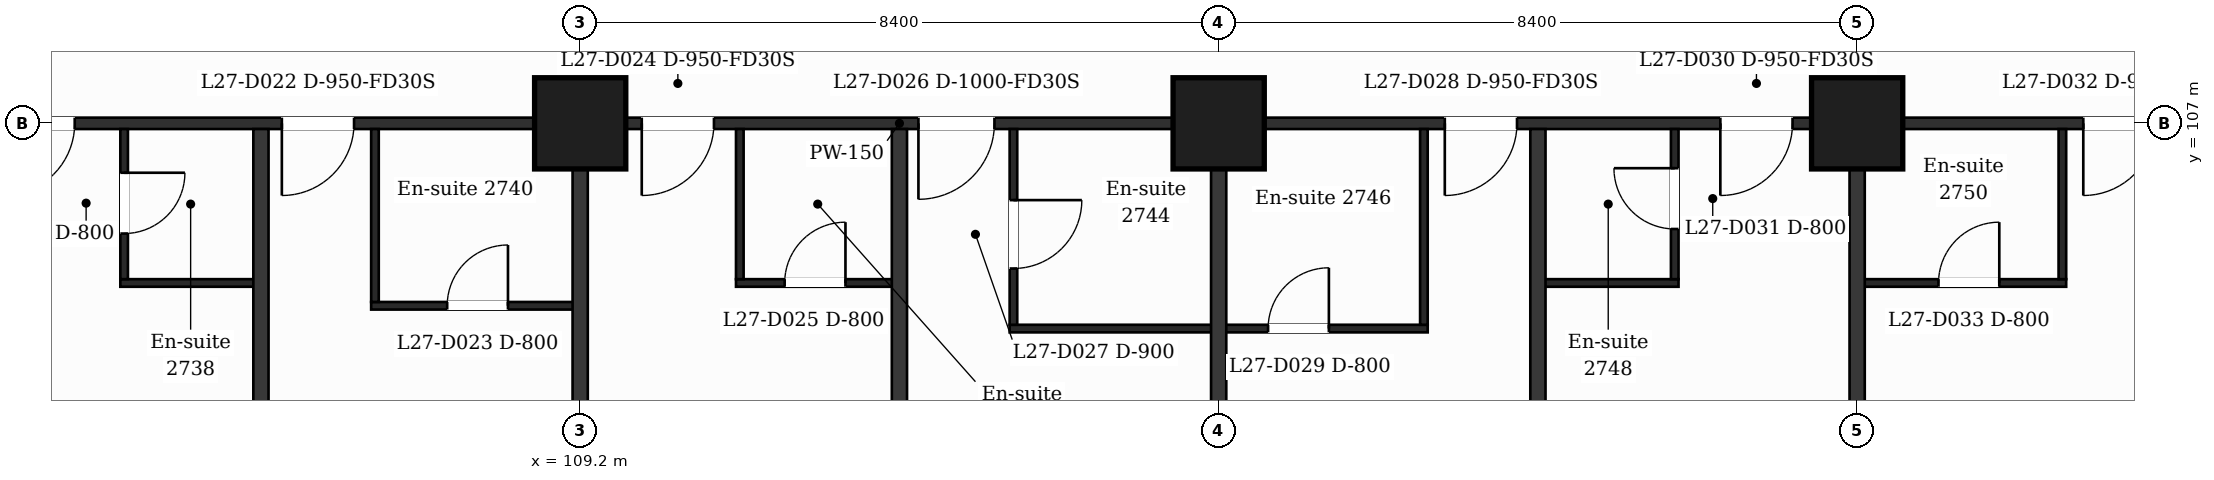
"""IFC4 building model, lengths in metres.
Left out: names, types, materials, properties, quantities, classifications, styles, units other than length and angle.
Written with IfcOpenShell. Run it as: python <this file> out.ifc"""

import sys

from ifc_helpers import new_model, si_unit, direction, frame, frame_2d, origin, origin_2d, place, context, subcontext, project, spatial, rectangle, extrude, element, fill, save


model = new_model("IFC4")
c1 = context("Model", 3, precision=1e-05, world=origin(), true_north=direction((0.0, 1.0)))
c2 = subcontext(c1, "Body", "Model", "MODEL_VIEW")
j1 = project(units=[si_unit("LENGTHUNIT", "METRE"), si_unit("PLANEANGLEUNIT", "RADIAN")], contexts=[c1])
p1 = place(None, origin())
s1 = spatial("IfcSite", under=j1, at=p1, CompositionType="ELEMENT")
p2 = place(p1, origin())
s2 = spatial("IfcBuilding", under=s1, at=p2, CompositionType="ELEMENT")
p3 = place(p2, frame((0.0, 0.0, 116.9)))
s3 = spatial("IfcBuildingStorey", under=s2, at=p3, CompositionType="ELEMENT", Elevation=116.9)
for number, where, z_axis, x_axis in (
    (1, (109.2, 107.0, 0.0), (0.0, 0.0, 1.0), (1.0, 0.0, 0.0)),
    (2, (117.6, 107.0, 0.0), (0.0, 0.0, 1.0), (1.0, 0.0, 0.0)),
    (3, (126.0, 107.0, 0.0), (0.0, 0.0, 1.0), (1.0, 0.0, 0.0)),
):
    element("IfcColumn", number, at=place(p3, frame(where, z_axis=z_axis, x_axis=x_axis)), inside=s3, PredefinedType="COLUMN", context=c2, shape_type="SweptSolid", body=[
        extrude(rectangle(XDim=1.2, YDim=1.2, at=origin_2d()), origin(), (0.0, 0.0, 1.0), 3.7),
    ])
p4 = place(p3, frame((114.85, 104.3, 0.0), z_axis=(0.0, 0.0, 1.0), x_axis=(1.0, 0.0, 0.0)))
e4 = element("IfcWall", 4, at=p4, inside=s3, PredefinedType="PARTITIONING", context=c2, shape_type="SweptSolid", body=[
    extrude(rectangle(XDim=5.5, YDim=0.1, at=frame_2d((2.75, 0.0))), origin(), (0.0, 0.0, 1.0), 3.38),
])
p5 = place(p4, frame((3.4, 0.0, 0.0)))
e5 = element("IfcOpeningElement", 5, at=p5, cuts=e4, PredefinedType="OPENING", context=c2, shape_type="SweptSolid", body=[
    extrude(rectangle(XDim=0.8, YDim=2.1, at=frame_2d((0.4, 1.05))), frame((0.0, 0.06, 0.0), z_axis=(0.0, -1.0, 0.0), x_axis=(1.0, 0.0, 0.0)), (0.0, 0.0, 1.0), 0.12),
])
p6 = place(p3, frame((106.45, 104.6, 0.0), z_axis=(0.0, 0.0, 1.0), x_axis=(1.0, 0.0, 0.0)))
e6 = element("IfcWall", 6, at=p6, inside=s3, PredefinedType="PARTITIONING", context=c2, shape_type="SweptSolid", body=[
    extrude(rectangle(XDim=2.75, YDim=0.1, at=frame_2d((1.375, 0.0))), origin(), (0.0, 0.0, 1.0), 3.38),
])
p7 = place(p6, frame((1.0, 0.0, 0.0)))
e7 = element("IfcOpeningElement", 7, at=p7, cuts=e6, PredefinedType="OPENING", context=c2, shape_type="SweptSolid", body=[
    extrude(rectangle(XDim=0.8, YDim=2.1, at=frame_2d((0.4, 1.05))), frame((0.0, 0.06, 0.0), z_axis=(0.0, -1.0, 0.0), x_axis=(1.0, 0.0, 0.0)), (0.0, 0.0, 1.0), 0.12),
])
p8 = place(p3, frame((103.15, 104.9, 0.0), z_axis=(0.0, 0.0, 1.0), x_axis=(1.0, 0.0, 0.0)))
e8 = element("IfcWall", 8, at=p8, inside=s3, PredefinedType="PARTITIONING", context=c2, shape_type="SweptSolid", body=[
    extrude(rectangle(XDim=1.85, YDim=0.1, at=frame_2d((0.925, 0.0))), origin(), (0.0, 0.0, 1.0), 3.38),
])
p9 = place(p3, frame((111.25, 104.9, 0.0), z_axis=(0.0, 0.0, 1.0), x_axis=(1.0, 0.0, 0.0)))
e9 = element("IfcWall", 9, at=p9, inside=s3, PredefinedType="PARTITIONING", context=c2, shape_type="SweptSolid", body=[
    extrude(rectangle(XDim=2.15, YDim=0.1, at=frame_2d((1.075, 0.0))), origin(), (0.0, 0.0, 1.0), 3.38),
])
p10 = place(p9, frame((0.64, 0.0, 0.0)))
e10 = element("IfcOpeningElement", 10, at=p10, cuts=e9, PredefinedType="OPENING", context=c2, shape_type="SweptSolid", body=[
    extrude(rectangle(XDim=0.8, YDim=2.1, at=frame_2d((0.4, 1.05))), frame((0.0, 0.06, 0.0), z_axis=(0.0, -1.0, 0.0), x_axis=(1.0, 0.0, 0.0)), (0.0, 0.0, 1.0), 0.12),
])
p11 = place(p3, frame((121.8, 104.9, 0.0), z_axis=(0.0, 0.0, 1.0), x_axis=(1.0, 0.0, 0.0)))
e11 = element("IfcWall", 11, at=p11, inside=s3, PredefinedType="PARTITIONING", context=c2, shape_type="SweptSolid", body=[
    extrude(rectangle(XDim=1.85, YDim=0.1, at=frame_2d((0.925, 0.0))), origin(), (0.0, 0.0, 1.0), 3.38),
])
p12 = place(p3, frame((126.0, 104.9, 0.0), z_axis=(0.0, 0.0, 1.0), x_axis=(1.0, 0.0, 0.0)))
e12 = element("IfcWall", 12, at=p12, inside=s3, PredefinedType="PARTITIONING", context=c2, shape_type="SweptSolid", body=[
    extrude(rectangle(XDim=2.75, YDim=0.1, at=frame_2d((1.375, 0.0))), origin(), (0.0, 0.0, 1.0), 3.38),
])
p13 = place(p12, frame((1.07, 0.0, 0.0)))
e13 = element("IfcOpeningElement", 13, at=p13, cuts=e12, PredefinedType="OPENING", context=c2, shape_type="SweptSolid", body=[
    extrude(rectangle(XDim=0.8, YDim=2.1, at=frame_2d((0.4, 1.05))), frame((0.0, 0.06, 0.0), z_axis=(0.0, -1.0, 0.0), x_axis=(1.0, 0.0, 0.0)), (0.0, 0.0, 1.0), 0.12),
])
p14 = place(p3, frame((87.018, 107.0, 0.0), z_axis=(0.0, 0.0, 1.0), x_axis=(1.0, 0.0, 0.0)))
e14 = element("IfcWall", 14, at=p14, inside=s3, PredefinedType="PARTITIONING", context=c2, shape_type="SweptSolid", body=[
    extrude(rectangle(XDim=52.765, YDim=0.15, at=frame_2d((26.382, 0.0))), origin(), (0.0, 0.0, 1.0), 3.38),
])
p15 = place(p14, frame((1.276, 0.0, 0.0)))
e15 = element("IfcOpeningElement", 15, at=p15, cuts=e14, PredefinedType="OPENING", context=c2, shape_type="SweptSolid", body=[
    extrude(rectangle(XDim=0.95, YDim=2.1, at=frame_2d((0.475, 1.05))), frame((0.0, 0.085, 0.0), z_axis=(0.0, -1.0, 0.0), x_axis=(1.0, 0.0, 0.0)), (0.0, 0.0, 1.0), 0.17),
])
p16 = place(p14, frame((6.192, 0.0, 0.0)))
e16 = element("IfcOpeningElement", 16, at=p16, cuts=e14, PredefinedType="OPENING", context=c2, shape_type="SweptSolid", body=[
    extrude(rectangle(XDim=0.95, YDim=2.1, at=frame_2d((0.475, 1.05))), frame((0.0, 0.085, 0.0), z_axis=(0.0, -1.0, 0.0), x_axis=(1.0, 0.0, 0.0)), (0.0, 0.0, 1.0), 0.17),
])
p17 = place(p14, frame((11.982, 0.0, 0.0)))
e17 = element("IfcOpeningElement", 17, at=p17, cuts=e14, PredefinedType="OPENING", context=c2, shape_type="SweptSolid", body=[
    extrude(rectangle(XDim=1.0, YDim=2.1, at=frame_2d((0.5, 1.05))), frame((0.0, 0.085, 0.0), z_axis=(0.0, -1.0, 0.0), x_axis=(1.0, 0.0, 0.0)), (0.0, 0.0, 1.0), 0.17),
])
p18 = place(p14, frame((14.582, 0.0, 0.0)))
e18 = element("IfcOpeningElement", 18, at=p18, cuts=e14, PredefinedType="OPENING", context=c2, shape_type="SweptSolid", body=[
    extrude(rectangle(XDim=0.95, YDim=2.1, at=frame_2d((0.475, 1.05))), frame((0.0, 0.085, 0.0), z_axis=(0.0, -1.0, 0.0), x_axis=(1.0, 0.0, 0.0)), (0.0, 0.0, 1.0), 0.17),
])
p19 = place(p14, frame((18.257, 0.0, 0.0)))
e19 = element("IfcOpeningElement", 19, at=p19, cuts=e14, PredefinedType="OPENING", context=c2, shape_type="SweptSolid", body=[
    extrude(rectangle(XDim=0.95, YDim=2.1, at=frame_2d((0.475, 1.05))), frame((0.0, 0.085, 0.0), z_axis=(0.0, -1.0, 0.0), x_axis=(1.0, 0.0, 0.0)), (0.0, 0.0, 1.0), 0.17),
])
p20 = place(p14, frame((22.992, 0.0, 0.0)))
e20 = element("IfcOpeningElement", 20, at=p20, cuts=e14, PredefinedType="OPENING", context=c2, shape_type="SweptSolid", body=[
    extrude(rectangle(XDim=0.95, YDim=2.1, at=frame_2d((0.475, 1.05))), frame((0.0, 0.085, 0.0), z_axis=(0.0, -1.0, 0.0), x_axis=(1.0, 0.0, 0.0)), (0.0, 0.0, 1.0), 0.17),
])
p21 = place(p14, frame((26.632, 0.0, 0.0)))
e21 = element("IfcOpeningElement", 21, at=p21, cuts=e14, PredefinedType="OPENING", context=c2, shape_type="SweptSolid", body=[
    extrude(rectangle(XDim=1.0, YDim=2.1, at=frame_2d((0.5, 1.05))), frame((0.0, 0.085, 0.0), z_axis=(0.0, -1.0, 0.0), x_axis=(1.0, 0.0, 0.0)), (0.0, 0.0, 1.0), 0.17),
])
p22 = place(p14, frame((33.557, 0.0, 0.0)))
e22 = element("IfcOpeningElement", 22, at=p22, cuts=e14, PredefinedType="OPENING", context=c2, shape_type="SweptSolid", body=[
    extrude(rectangle(XDim=0.95, YDim=2.1, at=frame_2d((0.475, 1.05))), frame((0.0, 0.085, 0.0), z_axis=(0.0, -1.0, 0.0), x_axis=(1.0, 0.0, 0.0)), (0.0, 0.0, 1.0), 0.17),
])
p23 = place(p14, frame((37.182, 0.0, 0.0)))
e23 = element("IfcOpeningElement", 23, at=p23, cuts=e14, PredefinedType="OPENING", context=c2, shape_type="SweptSolid", body=[
    extrude(rectangle(XDim=0.95, YDim=2.1, at=frame_2d((0.475, 1.05))), frame((0.0, 0.085, 0.0), z_axis=(0.0, -1.0, 0.0), x_axis=(1.0, 0.0, 0.0)), (0.0, 0.0, 1.0), 0.17),
])
p24 = place(p14, frame((41.957, 0.0, 0.0)))
e24 = element("IfcOpeningElement", 24, at=p24, cuts=e14, PredefinedType="OPENING", context=c2, shape_type="SweptSolid", body=[
    extrude(rectangle(XDim=0.95, YDim=2.1, at=frame_2d((0.475, 1.05))), frame((0.0, 0.085, 0.0), z_axis=(0.0, -1.0, 0.0), x_axis=(1.0, 0.0, 0.0)), (0.0, 0.0, 1.0), 0.17),
])
p25 = place(p14, frame((45.622, 0.0, 0.0)))
e25 = element("IfcOpeningElement", 25, at=p25, cuts=e14, PredefinedType="OPENING", context=c2, shape_type="SweptSolid", body=[
    extrude(rectangle(XDim=0.95, YDim=2.1, at=frame_2d((0.475, 1.05))), frame((0.0, 0.085, 0.0), z_axis=(0.0, -1.0, 0.0), x_axis=(1.0, 0.0, 0.0)), (0.0, 0.0, 1.0), 0.17),
])
p26 = place(p14, frame((48.56, 0.0, 0.0)))
e26 = element("IfcOpeningElement", 26, at=p26, cuts=e14, PredefinedType="OPENING", context=c2, shape_type="SweptSolid", body=[
    extrude(rectangle(XDim=0.95, YDim=2.1, at=frame_2d((0.475, 1.05))), frame((0.0, 0.085, 0.0), z_axis=(0.0, -1.0, 0.0), x_axis=(1.0, 0.0, 0.0)), (0.0, 0.0, 1.0), 0.17),
])
p27 = place(p3, frame((103.2, 104.95, 0.0), z_axis=(0.0, 0.0, 1.0), x_axis=(0.0, 1.0, 0.0)))
e27 = element("IfcWall", 27, at=p27, inside=s3, PredefinedType="PARTITIONING", context=c2, shape_type="SweptSolid", body=[
    extrude(rectangle(XDim=1.975, YDim=0.1, at=frame_2d((0.988, 0.0))), origin(), (0.0, 0.0, 1.0), 3.38),
])
p28 = place(p27, frame((0.6, 0.0, 0.0)))
e28 = element("IfcOpeningElement", 28, at=p28, cuts=e27, PredefinedType="OPENING", context=c2, shape_type="SweptSolid", body=[
    extrude(rectangle(XDim=0.8, YDim=2.1, at=frame_2d((0.4, 1.05))), frame((0.0, 0.06, 0.0), z_axis=(0.0, -1.0, 0.0), x_axis=(1.0, 0.0, 0.0)), (0.0, 0.0, 1.0), 0.12),
])
p29 = place(p3, frame((105.0, 99.79, 0.0), z_axis=(0.0, 0.0, 1.0), x_axis=(0.0, 1.0, 0.0)))
e29 = element("IfcWall", 29, at=p29, inside=s3, PredefinedType="PARTITIONING", context=c2, shape_type="SweptSolid", body=[
    extrude(rectangle(XDim=7.135, YDim=0.2, at=frame_2d((3.567, 0.0))), origin(), (0.0, 0.0, 1.0), 3.38),
])
p30 = place(p3, frame((106.5, 104.65, 0.0), z_axis=(0.0, 0.0, 1.0), x_axis=(0.0, 1.0, 0.0)))
e30 = element("IfcWall", 30, at=p30, inside=s3, PredefinedType="PARTITIONING", context=c2, shape_type="SweptSolid", body=[
    extrude(rectangle(XDim=2.275, YDim=0.1, at=frame_2d((1.138, 0.0))), origin(), (0.0, 0.0, 1.0), 3.38),
])
p31 = place(p3, frame((109.2, 99.79, 0.0), z_axis=(0.0, 0.0, 1.0), x_axis=(0.0, 1.0, 0.0)))
e31 = element("IfcWall", 31, at=p31, inside=s3, PredefinedType="PARTITIONING", context=c2, shape_type="SweptSolid", body=[
    extrude(rectangle(XDim=7.135, YDim=0.2, at=frame_2d((3.567, 0.0))), origin(), (0.0, 0.0, 1.0), 3.38),
])
p32 = place(p3, frame((111.3, 104.95, 0.0), z_axis=(0.0, 0.0, 1.0), x_axis=(0.0, 1.0, 0.0)))
e32 = element("IfcWall", 32, at=p32, inside=s3, PredefinedType="PARTITIONING", context=c2, shape_type="SweptSolid", body=[
    extrude(rectangle(XDim=1.975, YDim=0.1, at=frame_2d((0.988, 0.0))), origin(), (0.0, 0.0, 1.0), 3.38),
])
p33 = place(p3, frame((113.4, 99.79, 0.0), z_axis=(0.0, 0.0, 1.0), x_axis=(0.0, 1.0, 0.0)))
e33 = element("IfcWall", 33, at=p33, inside=s3, PredefinedType="PARTITIONING", context=c2, shape_type="SweptSolid", body=[
    extrude(rectangle(XDim=7.135, YDim=0.2, at=frame_2d((3.567, 0.0))), origin(), (0.0, 0.0, 1.0), 3.38),
])
p34 = place(p3, frame((114.9, 104.35, 0.0), z_axis=(0.0, 0.0, 1.0), x_axis=(0.0, 1.0, 0.0)))
e34 = element("IfcWall", 34, at=p34, inside=s3, PredefinedType="PARTITIONING", context=c2, shape_type="SweptSolid", body=[
    extrude(rectangle(XDim=2.575, YDim=0.1, at=frame_2d((1.288, 0.0))), origin(), (0.0, 0.0, 1.0), 3.38),
])
p35 = place(p34, frame((0.74, 0.0, 0.0)))
e35 = element("IfcOpeningElement", 35, at=p35, cuts=e34, PredefinedType="OPENING", context=c2, shape_type="SweptSolid", body=[
    extrude(rectangle(XDim=0.9, YDim=2.1, at=frame_2d((0.45, 1.05))), frame((0.0, 0.06, 0.0), z_axis=(0.0, -1.0, 0.0), x_axis=(1.0, 0.0, 0.0)), (0.0, 0.0, 1.0), 0.12),
])
p36 = place(p3, frame((117.6, 99.79, 0.0), z_axis=(0.0, 0.0, 1.0), x_axis=(0.0, 1.0, 0.0)))
e36 = element("IfcWall", 36, at=p36, inside=s3, PredefinedType="PARTITIONING", context=c2, shape_type="SweptSolid", body=[
    extrude(rectangle(XDim=7.135, YDim=0.2, at=frame_2d((3.567, 0.0))), origin(), (0.0, 0.0, 1.0), 3.38),
])
p37 = place(p3, frame((120.3, 104.35, 0.0), z_axis=(0.0, 0.0, 1.0), x_axis=(0.0, 1.0, 0.0)))
e37 = element("IfcWall", 37, at=p37, inside=s3, PredefinedType="PARTITIONING", context=c2, shape_type="SweptSolid", body=[
    extrude(rectangle(XDim=2.575, YDim=0.1, at=frame_2d((1.288, 0.0))), origin(), (0.0, 0.0, 1.0), 3.38),
])
p38 = place(p3, frame((121.8, 99.79, 0.0), z_axis=(0.0, 0.0, 1.0), x_axis=(0.0, 1.0, 0.0)))
e38 = element("IfcWall", 38, at=p38, inside=s3, PredefinedType="PARTITIONING", context=c2, shape_type="SweptSolid", body=[
    extrude(rectangle(XDim=7.135, YDim=0.2, at=frame_2d((3.567, 0.0))), origin(), (0.0, 0.0, 1.0), 3.38),
])
p39 = place(p3, frame((123.6, 104.95, 0.0), z_axis=(0.0, 0.0, 1.0), x_axis=(0.0, 1.0, 0.0)))
e39 = element("IfcWall", 39, at=p39, inside=s3, PredefinedType="PARTITIONING", context=c2, shape_type="SweptSolid", body=[
    extrude(rectangle(XDim=1.975, YDim=0.1, at=frame_2d((0.988, 0.0))), origin(), (0.0, 0.0, 1.0), 3.38),
])
p40 = place(p39, frame((0.66, 0.0, 0.0)))
e40 = element("IfcOpeningElement", 40, at=p40, cuts=e39, PredefinedType="OPENING", context=c2, shape_type="SweptSolid", body=[
    extrude(rectangle(XDim=0.8, YDim=2.1, at=frame_2d((0.4, 1.05))), frame((0.0, 0.06, 0.0), z_axis=(0.0, -1.0, 0.0), x_axis=(1.0, 0.0, 0.0)), (0.0, 0.0, 1.0), 0.12),
])
p41 = place(p3, frame((126.0, 99.79, 0.0), z_axis=(0.0, 0.0, 1.0), x_axis=(0.0, 1.0, 0.0)))
e41 = element("IfcWall", 41, at=p41, inside=s3, PredefinedType="PARTITIONING", context=c2, shape_type="SweptSolid", body=[
    extrude(rectangle(XDim=7.135, YDim=0.2, at=frame_2d((3.567, 0.0))), origin(), (0.0, 0.0, 1.0), 3.38),
])
p42 = place(p3, frame((128.7, 104.95, 0.0), z_axis=(0.0, 0.0, 1.0), x_axis=(0.0, 1.0, 0.0)))
e42 = element("IfcWall", 42, at=p42, inside=s3, PredefinedType="PARTITIONING", context=c2, shape_type="SweptSolid", body=[
    extrude(rectangle(XDim=1.975, YDim=0.1, at=frame_2d((0.988, 0.0))), origin(), (0.0, 0.0, 1.0), 3.38),
])
p43 = place(p18, origin())
e43 = element("IfcDoor", 43, at=p43, inside=s3, OperationType="SINGLE_SWING_LEFT", PredefinedType="DOOR", context=c2, shape_type="SweptSolid", body=[
    extrude(rectangle(XDim=0.95, YDim=2.1, at=frame_2d((0.475, 1.05))), frame((0.0, 0.025, 0.0), z_axis=(0.0, -1.0, 0.0), x_axis=(1.0, 0.0, 0.0)), (0.0, 0.0, 1.0), 0.05),
])
fill(e18, e43)
p44 = place(p28, origin())
e44 = element("IfcDoor", 44, at=p44, inside=s3, OperationType="SINGLE_SWING_RIGHT", PredefinedType="DOOR", context=c2, shape_type="SweptSolid", body=[
    extrude(rectangle(XDim=0.8, YDim=2.1, at=frame_2d((0.4, 1.05))), frame((0.0, 0.025, 0.0), z_axis=(0.0, -1.0, 0.0), x_axis=(1.0, 0.0, 0.0)), (0.0, 0.0, 1.0), 0.05),
])
fill(e28, e44)
p45 = place(p19, origin())
e45 = element("IfcDoor", 45, at=p45, inside=s3, OperationType="SINGLE_SWING_LEFT", PredefinedType="DOOR", context=c2, shape_type="SweptSolid", body=[
    extrude(rectangle(XDim=0.95, YDim=2.1, at=frame_2d((0.475, 1.05))), frame((0.0, 0.025, 0.0), z_axis=(0.0, -1.0, 0.0), x_axis=(1.0, 0.0, 0.0)), (0.0, 0.0, 1.0), 0.05),
])
fill(e19, e45)
p46 = place(p7, origin())
e46 = element("IfcDoor", 46, at=p46, inside=s3, OperationType="SINGLE_SWING_RIGHT", PredefinedType="DOOR", context=c2, shape_type="SweptSolid", body=[
    extrude(rectangle(XDim=0.8, YDim=2.1, at=frame_2d((0.4, 1.05))), frame((0.0, 0.025, 0.0), z_axis=(0.0, -1.0, 0.0), x_axis=(1.0, 0.0, 0.0)), (0.0, 0.0, 1.0), 0.05),
])
fill(e7, e46)
p47 = place(p20, origin())
e47 = element("IfcDoor", 47, at=p47, inside=s3, OperationType="SINGLE_SWING_LEFT", PredefinedType="DOOR", context=c2, shape_type="SweptSolid", body=[
    extrude(rectangle(XDim=0.95, YDim=2.1, at=frame_2d((0.475, 1.05))), frame((0.0, 0.025, 0.0), z_axis=(0.0, -1.0, 0.0), x_axis=(1.0, 0.0, 0.0)), (0.0, 0.0, 1.0), 0.05),
])
fill(e20, e47)
p48 = place(p10, origin())
e48 = element("IfcDoor", 48, at=p48, inside=s3, OperationType="SINGLE_SWING_RIGHT", PredefinedType="DOOR", context=c2, shape_type="SweptSolid", body=[
    extrude(rectangle(XDim=0.8, YDim=2.1, at=frame_2d((0.4, 1.05))), frame((0.0, 0.025, 0.0), z_axis=(0.0, -1.0, 0.0), x_axis=(1.0, 0.0, 0.0)), (0.0, 0.0, 1.0), 0.05),
])
fill(e10, e48)
p49 = place(p21, origin())
e49 = element("IfcDoor", 49, at=p49, inside=s3, OperationType="SINGLE_SWING_LEFT", PredefinedType="DOOR", context=c2, shape_type="SweptSolid", body=[
    extrude(rectangle(XDim=1.0, YDim=2.1, at=frame_2d((0.5, 1.05))), frame((0.0, 0.025, 0.0), z_axis=(0.0, -1.0, 0.0), x_axis=(1.0, 0.0, 0.0)), (0.0, 0.0, 1.0), 0.05),
])
fill(e21, e49)
p50 = place(p35, origin())
e50 = element("IfcDoor", 50, at=p50, inside=s3, OperationType="SINGLE_SWING_RIGHT", PredefinedType="DOOR", context=c2, shape_type="SweptSolid", body=[
    extrude(rectangle(XDim=0.9, YDim=2.1, at=frame_2d((0.45, 1.05))), frame((0.0, 0.025, 0.0), z_axis=(0.0, -1.0, 0.0), x_axis=(1.0, 0.0, 0.0)), (0.0, 0.0, 1.0), 0.05),
])
fill(e35, e50)
p51 = place(p22, origin())
e51 = element("IfcDoor", 51, at=p51, inside=s3, OperationType="SINGLE_SWING_LEFT", PredefinedType="DOOR", context=c2, shape_type="SweptSolid", body=[
    extrude(rectangle(XDim=0.95, YDim=2.1, at=frame_2d((0.475, 1.05))), frame((0.0, 0.025, 0.0), z_axis=(0.0, -1.0, 0.0), x_axis=(1.0, 0.0, 0.0)), (0.0, 0.0, 1.0), 0.05),
])
fill(e22, e51)
p52 = place(p5, origin())
e52 = element("IfcDoor", 52, at=p52, inside=s3, OperationType="SINGLE_SWING_RIGHT", PredefinedType="DOOR", context=c2, shape_type="SweptSolid", body=[
    extrude(rectangle(XDim=0.8, YDim=2.1, at=frame_2d((0.4, 1.05))), frame((0.0, 0.025, 0.0), z_axis=(0.0, -1.0, 0.0), x_axis=(1.0, 0.0, 0.0)), (0.0, 0.0, 1.0), 0.05),
])
fill(e5, e52)
p53 = place(p23, origin())
e53 = element("IfcDoor", 53, at=p53, inside=s3, OperationType="SINGLE_SWING_LEFT", PredefinedType="DOOR", context=c2, shape_type="SweptSolid", body=[
    extrude(rectangle(XDim=0.95, YDim=2.1, at=frame_2d((0.475, 1.05))), frame((0.0, 0.025, 0.0), z_axis=(0.0, -1.0, 0.0), x_axis=(1.0, 0.0, 0.0)), (0.0, 0.0, 1.0), 0.05),
])
fill(e23, e53)
p54 = place(p40, origin())
e54 = element("IfcDoor", 54, at=p54, inside=s3, OperationType="SINGLE_SWING_RIGHT", PredefinedType="DOOR", context=c2, shape_type="SweptSolid", body=[
    extrude(rectangle(XDim=0.8, YDim=2.1, at=frame_2d((0.4, 1.05))), frame((0.0, 0.025, 0.0), z_axis=(0.0, -1.0, 0.0), x_axis=(1.0, 0.0, 0.0)), (0.0, 0.0, 1.0), 0.05),
])
fill(e40, e54)
p55 = place(p24, origin())
e55 = element("IfcDoor", 55, at=p55, inside=s3, OperationType="SINGLE_SWING_LEFT", PredefinedType="DOOR", context=c2, shape_type="SweptSolid", body=[
    extrude(rectangle(XDim=0.95, YDim=2.1, at=frame_2d((0.475, 1.05))), frame((0.0, 0.025, 0.0), z_axis=(0.0, -1.0, 0.0), x_axis=(1.0, 0.0, 0.0)), (0.0, 0.0, 1.0), 0.05),
])
fill(e24, e55)
p56 = place(p13, origin())
e56 = element("IfcDoor", 56, at=p56, inside=s3, OperationType="SINGLE_SWING_RIGHT", PredefinedType="DOOR", context=c2, shape_type="SweptSolid", body=[
    extrude(rectangle(XDim=0.8, YDim=2.1, at=frame_2d((0.4, 1.05))), frame((0.0, 0.025, 0.0), z_axis=(0.0, -1.0, 0.0), x_axis=(1.0, 0.0, 0.0)), (0.0, 0.0, 1.0), 0.05),
])
fill(e13, e56)
save(model, sys.argv[1])
